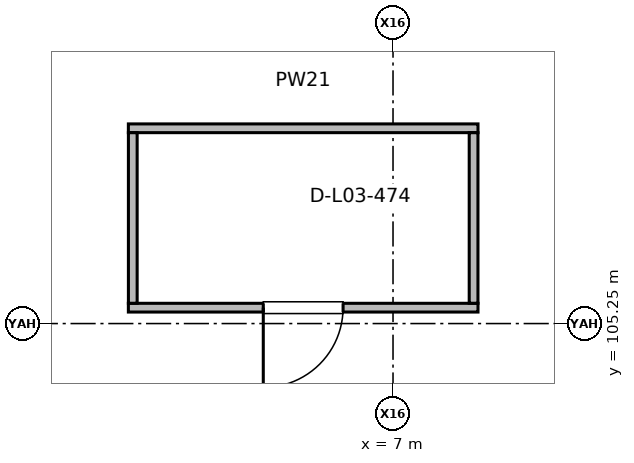
"""IFC4 building model, lengths in metres.
Left out: names, types, materials, properties, quantities, classifications, styles, units other than length and angle.
Written with IfcOpenShell. Run it as: python <this file> out.ifc"""

import sys

from ifc_helpers import new_model, si_unit, direction, frame, frame_2d, origin, place, context, subcontext, project, spatial, rectangle, extrude, element, fill, save


model = new_model("IFC4")
c1 = context("Model", 3, precision=1e-05, world=origin(), true_north=direction((0.0, 1.0)))
c2 = subcontext(c1, "Body", "Model", "MODEL_VIEW")
j1 = project(units=[si_unit("LENGTHUNIT", "METRE"), si_unit("PLANEANGLEUNIT", "RADIAN")], contexts=[c1])
p1 = place(None, origin())
s1 = spatial("IfcSite", under=j1, at=p1, CompositionType="ELEMENT")
p2 = place(p1, origin())
s2 = spatial("IfcBuilding", under=s1, at=p2, CompositionType="ELEMENT")
p3 = place(p2, frame((0.0, 0.0, 11.4)))
s3 = spatial("IfcBuildingStorey", under=s2, at=p3, CompositionType="ELEMENT", Elevation=11.4)
p4 = place(p3, frame((8.118, 105.459, 0.0), z_axis=(0.0, 0.0, 1.0), x_axis=(-1.0, 0.0, 0.0)))
e1 = element("IfcWall", 1, at=p4, inside=s3, PredefinedType="PARTITIONING", context=c2, shape_type="SweptSolid", body=[
    extrude(rectangle(XDim=4.6, YDim=0.115, at=frame_2d((2.3, 0.0))), origin(), (0.0, 0.0, 1.0), 3.475),
])
p5 = place(p4, frame((1.775, 0.0, 0.0)))
e2 = element("IfcOpeningElement", 2, at=p5, cuts=e1, PredefinedType="OPENING", context=c2, shape_type="SweptSolid", body=[
    extrude(rectangle(XDim=1.05, YDim=2.25, at=frame_2d((0.525, 1.125))), frame((0.0, 0.067, 0.0), z_axis=(0.0, -1.0, 0.0), x_axis=(1.0, 0.0, 0.0)), (0.0, 0.0, 1.0), 0.135),
])
p6 = place(p3, frame((3.518, 107.819, 0.0), z_axis=(0.0, 0.0, 1.0), x_axis=(1.0, 0.0, 0.0)))
e3 = element("IfcWall", 3, at=p6, inside=s3, PredefinedType="PARTITIONING", context=c2, shape_type="SweptSolid", body=[
    extrude(rectangle(XDim=4.6, YDim=0.115, at=frame_2d((2.3, 0.0))), origin(), (0.0, 0.0, 1.0), 3.82),
])
for number, where, z_axis, x_axis in (
    (4, (3.576, 105.517, 0.0), (0.0, 0.0, 1.0), (0.0, 1.0, 0.0)),
    (5, (8.06, 105.517, 0.0), (0.0, 0.0, 1.0), (0.0, 1.0, 0.0)),
):
    element("IfcWall", number, at=place(p3, frame(where, z_axis=z_axis, x_axis=x_axis)), inside=s3, PredefinedType="PARTITIONING", context=c2, shape_type="SweptSolid", body=[
        extrude(rectangle(XDim=2.244, YDim=0.115, at=frame_2d((1.122, 0.0))), origin(), (0.0, 0.0, 1.0), 3.475),
    ])
p7 = place(p5, origin())
e6 = element("IfcDoor", 6, at=p7, inside=s3, OperationType="SINGLE_SWING_RIGHT", PredefinedType="DOOR", context=c2, shape_type="SweptSolid", body=[
    extrude(rectangle(XDim=1.05, YDim=2.25, at=frame_2d((0.525, 1.125))), frame((0.0, 0.025, 0.0), z_axis=(0.0, -1.0, 0.0), x_axis=(1.0, 0.0, 0.0)), (0.0, 0.0, 1.0), 0.05),
])
fill(e2, e6)
save(model, sys.argv[1])
